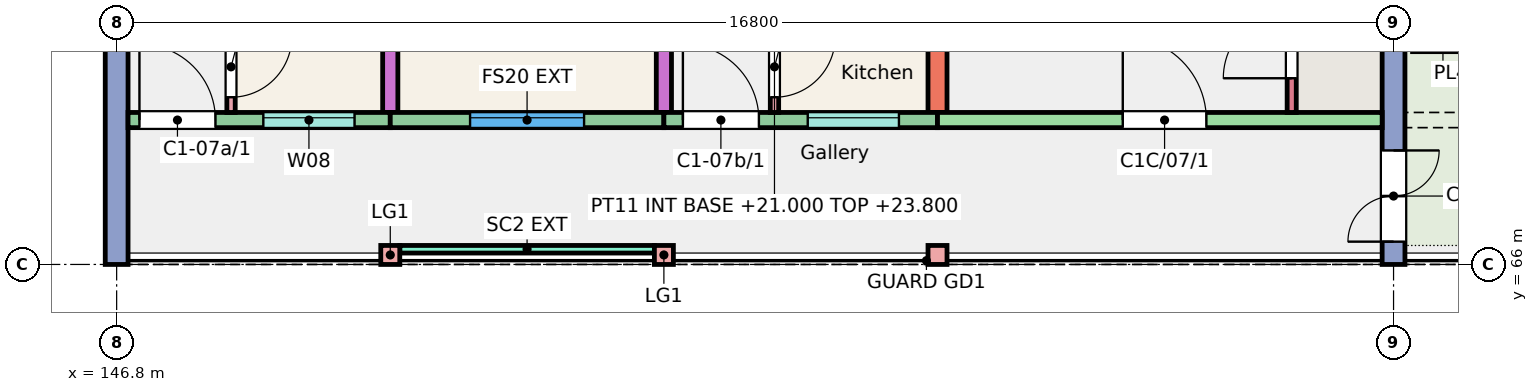
"""IFC4 building model, lengths in metres.
Left out: names, types, materials, properties, quantities, classifications, styles, units other than length and angle.
Written with IfcOpenShell. Run it as: python <this file> out.ifc"""

import sys

from ifc_helpers import new_model, si_unit, direction, frame, frame_2d, origin, origin_2d, place, context, subcontext, project, spatial, rectangle, extrude, element, fill, save


model = new_model("IFC4")
c1 = context("Model", 3, precision=1e-05, world=origin(), true_north=direction((0.0, 1.0)))
c2 = subcontext(c1, "Body", "Model", "MODEL_VIEW")
j1 = project(units=[si_unit("LENGTHUNIT", "METRE"), si_unit("PLANEANGLEUNIT", "RADIAN")], contexts=[c1])
p1 = place(None, origin())
s1 = spatial("IfcSite", under=j1, at=p1, CompositionType="ELEMENT")
p2 = place(p1, origin())
s2 = spatial("IfcBuilding", under=s1, at=p2, CompositionType="ELEMENT")
p3 = place(p2, frame((0.0, 0.0, 21.0)))
s3 = spatial("IfcBuildingStorey", under=s2, at=p3, CompositionType="ELEMENT", Elevation=21.0)
p4 = place(p3, frame((146.8, 66.0, 0.0), z_axis=(0.0, 0.0, 1.0), x_axis=(0.0, 1.0, 0.0)))
e1 = element("IfcWall", 1, at=p4, inside=s3, PredefinedType="SHEAR", context=c2, shape_type="SweptSolid", body=[
    extrude(rectangle(XDim=11.0, YDim=0.3, at=frame_2d((5.5, 0.0))), origin(), (0.0, 0.0, 1.0), 3.0),
])
p5 = place(p4, frame((7.805, 0.0, 0.9)))
e2 = element("IfcOpeningElement", 2, at=p5, cuts=e1, PredefinedType="OPENING", context=c2, shape_type="SweptSolid", body=[
    extrude(rectangle(XDim=1.8, YDim=1.5, at=frame_2d((0.9, 0.75))), frame((0.0, 0.16, 0.0), z_axis=(0.0, -1.0, 0.0), x_axis=(1.0, 0.0, 0.0)), (0.0, 0.0, 1.0), 0.32),
])
p6 = place(p3, frame((150.4, 68.0, 0.0), z_axis=(0.0, 0.0, 1.0), x_axis=(0.0, 1.0, 0.0)))
e3 = element("IfcWall", 3, at=p6, inside=s3, PredefinedType="SHEAR", context=c2, shape_type="SweptSolid", body=[
    extrude(rectangle(XDim=9.0, YDim=0.2, at=frame_2d((4.5, 0.0))), origin(), (0.0, 0.0, 1.0), 3.0),
])
p7 = place(p3, frame((154.0, 68.0, 0.0), z_axis=(0.0, 0.0, 1.0), x_axis=(0.0, 1.0, 0.0)))
e4 = element("IfcWall", 4, at=p7, inside=s3, PredefinedType="SHEAR", context=c2, shape_type="SweptSolid", body=[
    extrude(rectangle(XDim=9.0, YDim=0.2, at=frame_2d((4.5, 0.0))), origin(), (0.0, 0.0, 1.0), 3.0),
])
p8 = place(p7, frame((2.4, 0.0, 0.0)))
e5 = element("IfcOpeningElement", 5, at=p8, cuts=e4, PredefinedType="OPENING", context=c2, shape_type="SweptSolid", body=[
    extrude(rectangle(XDim=1.2, YDim=2.1, at=frame_2d((0.6, 1.05))), frame((0.0, 0.11, 0.0), z_axis=(0.0, -1.0, 0.0), x_axis=(1.0, 0.0, 0.0)), (0.0, 0.0, 1.0), 0.22),
])
p9 = place(p7, frame((6.4, 0.0, 0.0)))
e6 = element("IfcOpeningElement", 6, at=p9, cuts=e4, PredefinedType="OPENING", context=c2, shape_type="SweptSolid", body=[
    extrude(rectangle(XDim=1.2, YDim=2.1, at=frame_2d((0.6, 1.05))), frame((0.0, 0.11, 0.0), z_axis=(0.0, -1.0, 0.0), x_axis=(1.0, 0.0, 0.0)), (0.0, 0.0, 1.0), 0.22),
])
p10 = place(p3, frame((157.6, 68.0, 0.0), z_axis=(0.0, 0.0, 1.0), x_axis=(0.0, 1.0, 0.0)))
e7 = element("IfcWall", 7, at=p10, inside=s3, PredefinedType="SHEAR", context=c2, shape_type="SweptSolid", body=[
    extrude(rectangle(XDim=9.0, YDim=0.25, at=frame_2d((4.5, 0.0))), origin(), (0.0, 0.0, 1.0), 3.0),
])
p11 = place(p3, frame((163.6, 66.0, 0.0), z_axis=(0.0, 0.0, 1.0), x_axis=(0.0, 1.0, 0.0)))
e8 = element("IfcWall", 8, at=p11, inside=s3, PredefinedType="SHEAR", context=c2, shape_type="SweptSolid", body=[
    extrude(rectangle(XDim=11.0, YDim=0.3, at=frame_2d((5.5, 0.0))), origin(), (0.0, 0.0, 1.0), 3.0),
])
p12 = place(p11, frame((0.3, 0.0, 0.0)))
e9 = element("IfcOpeningElement", 9, at=p12, cuts=e8, PredefinedType="OPENING", context=c2, shape_type="SweptSolid", body=[
    extrude(rectangle(XDim=1.2, YDim=2.1, at=frame_2d((0.6, 1.05))), frame((0.0, 0.16, 0.0), z_axis=(0.0, -1.0, 0.0), x_axis=(1.0, 0.0, 0.0)), (0.0, 0.0, 1.0), 0.32),
])
p13 = place(p3, frame((146.95, 67.9, 0.0), z_axis=(0.0, 0.0, 1.0), x_axis=(1.0, 0.0, 0.0)))
e10 = element("IfcWall", 10, at=p13, inside=s3, PredefinedType="SOLIDWALL", context=c2, shape_type="SweptSolid", body=[
    extrude(rectangle(XDim=3.45, YDim=0.2, at=frame_2d((1.725, 0.0))), origin(), (0.0, 0.0, 1.0), 3.0),
])
p14 = place(p13, frame((1.78, 0.0, 1.1)))
e11 = element("IfcOpeningElement", 11, at=p14, cuts=e10, PredefinedType="OPENING", context=c2, shape_type="SweptSolid", body=[
    extrude(rectangle(XDim=1.2, YDim=1.3, at=frame_2d((0.6, 0.65))), frame((0.0, 0.11, 0.0), z_axis=(0.0, -1.0, 0.0), x_axis=(1.0, 0.0, 0.0)), (0.0, 0.0, 1.0), 0.22),
])
p15 = place(p13, frame((0.15, 0.0, 0.0)))
e12 = element("IfcOpeningElement", 12, at=p15, cuts=e10, PredefinedType="OPENING", context=c2, shape_type="SweptSolid", body=[
    extrude(rectangle(XDim=1.0, YDim=2.1, at=frame_2d((0.5, 1.05))), frame((0.0, 0.11, 0.0), z_axis=(0.0, -1.0, 0.0), x_axis=(1.0, 0.0, 0.0)), (0.0, 0.0, 1.0), 0.22),
])
p16 = place(p3, frame((150.4, 67.9, 0.0), z_axis=(0.0, 0.0, 1.0), x_axis=(1.0, 0.0, 0.0)))
e13 = element("IfcWall", 13, at=p16, inside=s3, PredefinedType="SOLIDWALL", context=c2, shape_type="SweptSolid", body=[
    extrude(rectangle(XDim=3.6, YDim=0.2, at=frame_2d((1.8, 0.0))), origin(), (0.0, 0.0, 1.0), 3.0),
])
p17 = place(p16, frame((1.05, 0.0, 0.9)))
e14 = element("IfcOpeningElement", 14, at=p17, cuts=e13, PredefinedType="OPENING", context=c2, shape_type="SweptSolid", body=[
    extrude(rectangle(XDim=1.5, YDim=1.5, at=frame_2d((0.75, 0.75))), frame((0.0, 0.11, 0.0), z_axis=(0.0, -1.0, 0.0), x_axis=(1.0, 0.0, 0.0)), (0.0, 0.0, 1.0), 0.22),
])
p18 = place(p3, frame((154.0, 67.9, 0.0), z_axis=(0.0, 0.0, 1.0), x_axis=(1.0, 0.0, 0.0)))
e15 = element("IfcWall", 15, at=p18, inside=s3, PredefinedType="SOLIDWALL", context=c2, shape_type="SweptSolid", body=[
    extrude(rectangle(XDim=3.6, YDim=0.2, at=frame_2d((1.8, 0.0))), origin(), (0.0, 0.0, 1.0), 3.0),
])
p19 = place(p18, frame((1.893, 0.0, 1.1)))
e16 = element("IfcOpeningElement", 16, at=p19, cuts=e15, PredefinedType="OPENING", context=c2, shape_type="SweptSolid", body=[
    extrude(rectangle(XDim=1.2, YDim=1.3, at=frame_2d((0.6, 0.65))), frame((0.0, 0.11, 0.0), z_axis=(0.0, -1.0, 0.0), x_axis=(1.0, 0.0, 0.0)), (0.0, 0.0, 1.0), 0.22),
])
p20 = place(p18, frame((0.25, 0.0, 0.0)))
e17 = element("IfcOpeningElement", 17, at=p20, cuts=e15, PredefinedType="OPENING", context=c2, shape_type="SweptSolid", body=[
    extrude(rectangle(XDim=1.0, YDim=2.1, at=frame_2d((0.5, 1.05))), frame((0.0, 0.11, 0.0), z_axis=(0.0, -1.0, 0.0), x_axis=(1.0, 0.0, 0.0)), (0.0, 0.0, 1.0), 0.22),
])
p21 = place(p3, frame((157.6, 67.9, 0.0), z_axis=(0.0, 0.0, 1.0), x_axis=(1.0, 0.0, 0.0)))
e18 = element("IfcWall", 18, at=p21, inside=s3, PredefinedType="SHEAR", context=c2, shape_type="SweptSolid", body=[
    extrude(rectangle(XDim=5.85, YDim=0.2, at=frame_2d((2.925, 0.0))), origin(), (0.0, 0.0, 1.0), 3.0),
])
p22 = place(p21, frame((2.438, 0.0, 0.0)))
e19 = element("IfcOpeningElement", 19, at=p22, cuts=e18, PredefinedType="OPENING", context=c2, shape_type="SweptSolid", body=[
    extrude(rectangle(XDim=1.1, YDim=2.1, at=frame_2d((0.55, 1.05))), frame((0.0, 0.11, 0.0), z_axis=(0.0, -1.0, 0.0), x_axis=(1.0, 0.0, 0.0)), (0.0, 0.0, 1.0), 0.22),
])
p23 = place(p3, frame((162.26, 68.0, 0.0), z_axis=(0.0, 0.0, 1.0), x_axis=(0.0, 1.0, 0.0)))
e20 = element("IfcWall", 20, at=p23, inside=s3, PredefinedType="SHEAR", context=c2, shape_type="SweptSolid", body=[
    extrude(rectangle(XDim=1.72, YDim=0.12, at=frame_2d((0.86, 0.0))), origin(), (0.0, 0.0, 1.0), 3.0),
])
p24 = place(p23, frame((0.45, 0.0, 0.0)))
e21 = element("IfcOpeningElement", 21, at=p24, cuts=e20, PredefinedType="OPENING", context=c2, shape_type="SweptSolid", body=[
    extrude(rectangle(XDim=0.9, YDim=2.1, at=frame_2d((0.45, 1.05))), frame((0.0, 0.07, 0.0), z_axis=(0.0, -1.0, 0.0), x_axis=(1.0, 0.0, 0.0)), (0.0, 0.0, 1.0), 0.14),
])
for number, where, z_axis, x_axis in (
    (22, (150.4, 66.125, 0.0), (0.0, 0.0, 1.0), (1.0, 0.0, 0.0)),
    (23, (154.0, 66.125, 0.0), (0.0, 0.0, 1.0), (1.0, 0.0, 0.0)),
    (24, (157.6, 66.125, 0.0), (0.0, 0.0, 1.0), (1.0, 0.0, 0.0)),
):
    element("IfcColumn", number, at=place(p3, frame(where, z_axis=z_axis, x_axis=x_axis)), inside=s3, PredefinedType="COLUMN", context=c2, shape_type="SweptSolid", body=[
        extrude(rectangle(XDim=0.25, YDim=0.25, at=origin_2d()), origin(), (0.0, 0.0, 1.0), 3.0),
    ])
p25 = place(p3, frame((163.85, 68.9, 0.01), z_axis=(0.0, 0.0, 1.0), x_axis=(1.0, 0.0, 0.0)))
e25 = element("IfcWall", 25, at=p25, inside=s3, PredefinedType="SOLIDWALL", context=c2, shape_type="SweptSolid", body=[
    extrude(rectangle(XDim=0.8, YDim=0.2, at=frame_2d((0.4, 0.0))), origin(), (0.0, 0.0, 1.0), 0.45),
])
p26 = place(p3, frame((150.525, 66.2, 0.0), z_axis=(0.0, 0.0, 1.0), x_axis=(1.0, 0.0, 0.0)))
e26 = element("IfcWall", 26, at=p26, inside=s3, PredefinedType="SOLIDWALL", context=c2, shape_type="SweptSolid", body=[
    extrude(rectangle(XDim=3.35, YDim=0.1, at=frame_2d((1.675, 0.0))), origin(), (0.0, 0.0, 1.0), 2.45),
])
p27 = place(p3, frame((148.305, 68.0, 0.0), z_axis=(0.0, 0.0, 1.0), x_axis=(0.0, 1.0, 0.0)))
e27 = element("IfcWall", 27, at=p27, inside=s3, PredefinedType="PARTITIONING", context=c2, shape_type="SweptSolid", body=[
    extrude(rectangle(XDim=4.3, YDim=0.11, at=frame_2d((2.15, 0.0))), origin(), (0.0, 0.0, 1.0), 2.75),
])
p28 = place(p27, frame((0.2, 0.0, 0.0)))
e28 = element("IfcOpeningElement", 28, at=p28, cuts=e27, PredefinedType="OPENING", context=c2, shape_type="SweptSolid", body=[
    extrude(rectangle(XDim=0.8, YDim=2.1, at=frame_2d((0.4, 1.05))), frame((0.0, 0.065, 0.0), z_axis=(0.0, -1.0, 0.0), x_axis=(1.0, 0.0, 0.0)), (0.0, 0.0, 1.0), 0.13),
])
p29 = place(p27, frame((3.35, 0.0, 0.0)))
e29 = element("IfcOpeningElement", 29, at=p29, cuts=e27, PredefinedType="OPENING", context=c2, shape_type="SweptSolid", body=[
    extrude(rectangle(XDim=0.8, YDim=2.1, at=frame_2d((0.4, 1.05))), frame((0.0, 0.065, 0.0), z_axis=(0.0, -1.0, 0.0), x_axis=(1.0, 0.0, 0.0)), (0.0, 0.0, 1.0), 0.13),
])
p30 = place(p3, frame((155.455, 68.0, 0.0), z_axis=(0.0, 0.0, 1.0), x_axis=(0.0, 1.0, 0.0)))
e30 = element("IfcWall", 30, at=p30, inside=s3, PredefinedType="PARTITIONING", context=c2, shape_type="SweptSolid", body=[
    extrude(rectangle(XDim=4.5, YDim=0.11, at=frame_2d((2.25, 0.0))), origin(), (0.0, 0.0, 1.0), 2.8),
])
p31 = place(p30, frame((0.2, 0.0, 0.0)))
e31 = element("IfcOpeningElement", 31, at=p31, cuts=e30, PredefinedType="OPENING", context=c2, shape_type="SweptSolid", body=[
    extrude(rectangle(XDim=0.8, YDim=2.1, at=frame_2d((0.4, 1.05))), frame((0.0, 0.065, 0.0), z_axis=(0.0, -1.0, 0.0), x_axis=(1.0, 0.0, 0.0)), (0.0, 0.0, 1.0), 0.13),
])
p32 = place(p30, frame((3.55, 0.0, 0.0)))
e32 = element("IfcOpeningElement", 32, at=p32, cuts=e30, PredefinedType="OPENING", context=c2, shape_type="SweptSolid", body=[
    extrude(rectangle(XDim=0.8, YDim=2.1, at=frame_2d((0.4, 1.05))), frame((0.0, 0.065, 0.0), z_axis=(0.0, -1.0, 0.0), x_axis=(1.0, 0.0, 0.0)), (0.0, 0.0, 1.0), 0.13),
])
p33 = place(p14, origin())
e33 = element("IfcWindow", 33, at=p33, inside=s3, PartitioningType="SINGLE_PANEL", PredefinedType="WINDOW", context=c2, shape_type="SweptSolid", body=[
    extrude(rectangle(XDim=1.2, YDim=1.3, at=frame_2d((0.6, 0.65))), frame((0.0, 0.06, 0.0), z_axis=(0.0, -1.0, 0.0), x_axis=(1.0, 0.0, 0.0)), (0.0, 0.0, 1.0), 0.06),
])
fill(e11, e33)
p34 = place(p17, origin())
e34 = element("IfcWindow", 34, at=p34, inside=s3, PartitioningType="SINGLE_PANEL", PredefinedType="WINDOW", context=c2, shape_type="SweptSolid", body=[
    extrude(rectangle(XDim=1.5, YDim=1.5, at=frame_2d((0.75, 0.75))), frame((0.0, 0.06, 0.0), z_axis=(0.0, -1.0, 0.0), x_axis=(1.0, 0.0, 0.0)), (0.0, 0.0, 1.0), 0.06),
])
fill(e14, e34)
p35 = place(p19, origin())
e35 = element("IfcWindow", 35, at=p35, inside=s3, PartitioningType="SINGLE_PANEL", PredefinedType="WINDOW", context=c2, shape_type="SweptSolid", body=[
    extrude(rectangle(XDim=1.2, YDim=1.3, at=frame_2d((0.6, 0.65))), frame((0.0, 0.06, 0.0), z_axis=(0.0, -1.0, 0.0), x_axis=(1.0, 0.0, 0.0)), (0.0, 0.0, 1.0), 0.06),
])
fill(e16, e35)
p36 = place(p15, origin())
e36 = element("IfcDoor", 36, at=p36, inside=s3, OperationType="SINGLE_SWING_LEFT", PredefinedType="DOOR", context=c2, shape_type="SweptSolid", body=[
    extrude(rectangle(XDim=1.0, YDim=2.1, at=frame_2d((0.5, 1.05))), frame((0.0, 0.025, 0.0), z_axis=(0.0, -1.0, 0.0), x_axis=(1.0, 0.0, 0.0)), (0.0, 0.0, 1.0), 0.05),
])
fill(e12, e36)
p37 = place(p28, origin())
e37 = element("IfcDoor", 37, at=p37, inside=s3, OperationType="SINGLE_SWING_RIGHT", PredefinedType="DOOR", context=c2, shape_type="SweptSolid", body=[
    extrude(rectangle(XDim=0.8, YDim=2.1, at=frame_2d((0.4, 1.05))), frame((0.0, 0.025, 0.0), z_axis=(0.0, -1.0, 0.0), x_axis=(1.0, 0.0, 0.0)), (0.0, 0.0, 1.0), 0.05),
])
fill(e28, e37)
p38 = place(p20, origin())
e38 = element("IfcDoor", 38, at=p38, inside=s3, OperationType="SINGLE_SWING_LEFT", PredefinedType="DOOR", context=c2, shape_type="SweptSolid", body=[
    extrude(rectangle(XDim=1.0, YDim=2.1, at=frame_2d((0.5, 1.05))), frame((0.0, 0.025, 0.0), z_axis=(0.0, -1.0, 0.0), x_axis=(1.0, 0.0, 0.0)), (0.0, 0.0, 1.0), 0.05),
])
fill(e17, e38)
p39 = place(p31, origin())
e39 = element("IfcDoor", 39, at=p39, inside=s3, OperationType="SINGLE_SWING_RIGHT", PredefinedType="DOOR", context=c2, shape_type="SweptSolid", body=[
    extrude(rectangle(XDim=0.8, YDim=2.1, at=frame_2d((0.4, 1.05))), frame((0.0, 0.025, 0.0), z_axis=(0.0, -1.0, 0.0), x_axis=(1.0, 0.0, 0.0)), (0.0, 0.0, 1.0), 0.05),
])
fill(e31, e39)
p40 = place(p22, origin())
e40 = element("IfcDoor", 40, at=p40, inside=s3, OperationType="SINGLE_SWING_LEFT", PredefinedType="DOOR", context=c2, shape_type="SweptSolid", body=[
    extrude(rectangle(XDim=1.1, YDim=2.1, at=frame_2d((0.55, 1.05))), frame((0.0, 0.025, 0.0), z_axis=(0.0, -1.0, 0.0), x_axis=(1.0, 0.0, 0.0)), (0.0, 0.0, 1.0), 0.05),
])
fill(e19, e40)
p41 = place(p24, origin())
e41 = element("IfcDoor", 41, at=p41, inside=s3, OperationType="SINGLE_SWING_LEFT", PredefinedType="DOOR", context=c2, shape_type="SweptSolid", body=[
    extrude(rectangle(XDim=0.9, YDim=2.1, at=frame_2d((0.45, 1.05))), frame((0.0, 0.025, 0.0), z_axis=(0.0, -1.0, 0.0), x_axis=(1.0, 0.0, 0.0)), (0.0, 0.0, 1.0), 0.05),
])
fill(e21, e41)
p42 = place(p12, origin())
e42 = element("IfcDoor", 42, at=p42, inside=s3, OperationType="DOUBLE_DOOR_SINGLE_SWING", PredefinedType="DOOR", context=c2, shape_type="SweptSolid", body=[
    extrude(rectangle(XDim=1.2, YDim=2.1, at=frame_2d((0.6, 1.05))), frame((0.0, 0.025, 0.0), z_axis=(0.0, -1.0, 0.0), x_axis=(1.0, 0.0, 0.0)), (0.0, 0.0, 1.0), 0.05),
])
fill(e9, e42)
save(model, sys.argv[1])
